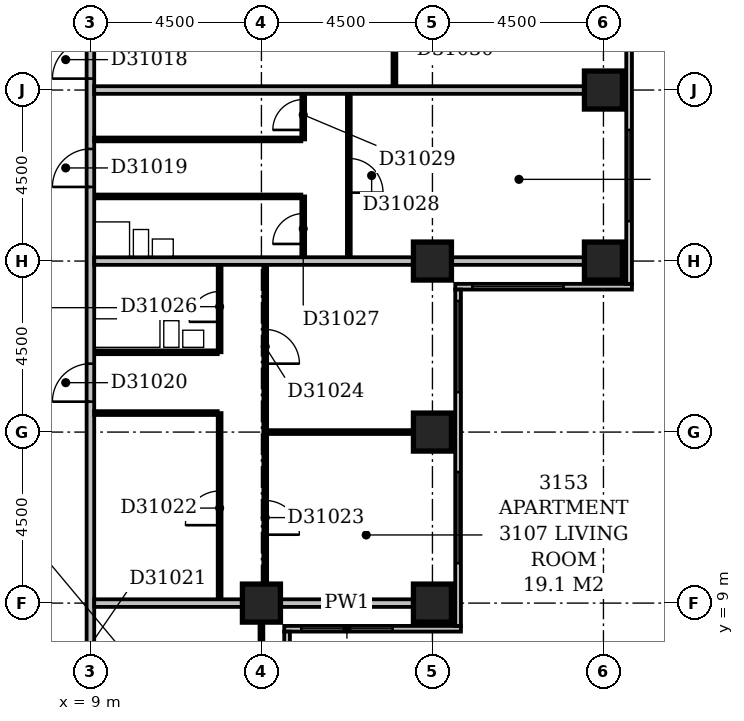
"""IFC4 building model, lengths in metres.
Left out: names, types, materials, properties, quantities, classifications, styles, units other than length and angle.
Written with IfcOpenShell. Run it as: python <this file> out.ifc"""

import sys

from ifc_helpers import new_model, si_unit, direction, frame, frame_2d, origin, origin_2d, place, context, subcontext, project, spatial, rectangle, extrude, element, fill, save


model = new_model("IFC4")
c1 = context("Model", 3, precision=1e-05, world=origin(), true_north=direction((0.0, 1.0)))
c2 = subcontext(c1, "Body", "Model", "MODEL_VIEW")
j1 = project(units=[si_unit("LENGTHUNIT", "METRE"), si_unit("PLANEANGLEUNIT", "RADIAN")], contexts=[c1])
p1 = place(None, origin())
s1 = spatial("IfcSite", under=j1, at=p1, CompositionType="ELEMENT")
p2 = place(p1, origin())
s2 = spatial("IfcBuilding", under=s1, at=p2, CompositionType="ELEMENT")
p3 = place(p2, frame((0.0, 0.0, 126.8)))
s3 = spatial("IfcBuildingStorey", under=s2, at=p3, CompositionType="ELEMENT", Elevation=126.8)
for number, where, z_axis, x_axis in (
    (1, (13.5, 9.0, -0.3), (0.0, 0.0, 1.0), (1.0, 0.0, 0.0)),
    (2, (18.0, 9.0, -0.3), (0.0, 0.0, 1.0), (1.0, 0.0, 0.0)),
    (3, (18.0, 13.5, -0.3), (0.0, 0.0, 1.0), (1.0, 0.0, 0.0)),
    (4, (18.0, 18.0, -0.3), (0.0, 0.0, 1.0), (1.0, 0.0, 0.0)),
    (5, (22.5, 18.0, -0.3), (0.0, 0.0, 1.0), (1.0, 0.0, 0.0)),
    (6, (22.5, 22.5, -0.3), (0.0, 0.0, 1.0), (1.0, 0.0, 0.0)),
):
    element("IfcColumn", number, at=place(p3, frame(where, z_axis=z_axis, x_axis=x_axis)), inside=s3, PredefinedType="COLUMN", context=c2, shape_type="SweptSolid", body=[
        extrude(rectangle(XDim=1.0, YDim=1.0, at=origin_2d()), origin(), (0.0, 0.0, 1.0), 3.6),
    ])
p4 = place(p3, frame((14.175, 3.9, 0.0), z_axis=(0.0, 0.0, 1.0), x_axis=(0.0, 1.0, 0.0)))
e7 = element("IfcWall", 7, at=p4, inside=s3, PredefinedType="STANDARD", context=c2, shape_type="SweptSolid", body=[
    extrude(rectangle(XDim=4.35, YDim=0.15, at=frame_2d((2.175, 0.0))), origin(), (0.0, 0.0, 1.0), 2.7),
])
p5 = place(p4, frame((1.65, 0.0, 0.6)))
e8 = element("IfcOpeningElement", 8, at=p5, cuts=e7, PredefinedType="OPENING", context=c2, shape_type="SweptSolid", body=[
    extrude(rectangle(XDim=2.4, YDim=1.8, at=frame_2d((1.2, 0.9))), frame((0.0, 0.087, 0.0), z_axis=(0.0, -1.0, 0.0), x_axis=(1.0, 0.0, 0.0)), (0.0, 0.0, 1.0), 0.174),
])
p6 = place(p3, frame((14.1, 8.325, 0.0), z_axis=(0.0, 0.0, 1.0), x_axis=(1.0, 0.0, 0.0)))
e9 = element("IfcWall", 9, at=p6, inside=s3, PredefinedType="STANDARD", context=c2, shape_type="SweptSolid", body=[
    extrude(rectangle(XDim=4.65, YDim=0.15, at=frame_2d((2.325, 0.0))), origin(), (0.0, 0.0, 1.0), 2.7),
])
p7 = place(p6, frame((0.45, 0.0, 0.6)))
e10 = element("IfcOpeningElement", 10, at=p7, cuts=e9, PredefinedType="OPENING", context=c2, shape_type="SweptSolid", body=[
    extrude(rectangle(XDim=2.4, YDim=1.8, at=frame_2d((1.2, 0.9))), frame((0.0, 0.087, 0.0), z_axis=(0.0, -1.0, 0.0), x_axis=(1.0, 0.0, 0.0)), (0.0, 0.0, 1.0), 0.174),
])
p8 = place(p3, frame((18.675, 8.4, 0.0), z_axis=(0.0, 0.0, 1.0), x_axis=(0.0, 1.0, 0.0)))
e11 = element("IfcWall", 11, at=p8, inside=s3, PredefinedType="STANDARD", context=c2, shape_type="SweptSolid", body=[
    extrude(rectangle(XDim=8.85, YDim=0.15, at=frame_2d((4.425, 0.0))), origin(), (0.0, 0.0, 1.0), 2.7),
])
p9 = place(p8, frame((1.65, 0.0, 0.6)))
e12 = element("IfcOpeningElement", 12, at=p9, cuts=e11, PredefinedType="OPENING", context=c2, shape_type="SweptSolid", body=[
    extrude(rectangle(XDim=2.4, YDim=1.8, at=frame_2d((1.2, 0.9))), frame((0.0, 0.087, 0.0), z_axis=(0.0, -1.0, 0.0), x_axis=(1.0, 0.0, 0.0)), (0.0, 0.0, 1.0), 0.174),
])
p10 = place(p8, frame((6.15, 0.0, 0.6)))
e13 = element("IfcOpeningElement", 13, at=p10, cuts=e11, PredefinedType="OPENING", context=c2, shape_type="SweptSolid", body=[
    extrude(rectangle(XDim=2.4, YDim=1.8, at=frame_2d((1.2, 0.9))), frame((0.0, 0.087, 0.0), z_axis=(0.0, -1.0, 0.0), x_axis=(1.0, 0.0, 0.0)), (0.0, 0.0, 1.0), 0.174),
])
p11 = place(p3, frame((18.6, 17.325, 0.0), z_axis=(0.0, 0.0, 1.0), x_axis=(1.0, 0.0, 0.0)))
e14 = element("IfcWall", 14, at=p11, inside=s3, PredefinedType="STANDARD", context=c2, shape_type="SweptSolid", body=[
    extrude(rectangle(XDim=4.65, YDim=0.15, at=frame_2d((2.325, 0.0))), origin(), (0.0, 0.0, 1.0), 2.7),
])
p12 = place(p11, frame((0.45, 0.0, 0.6)))
e15 = element("IfcOpeningElement", 15, at=p12, cuts=e14, PredefinedType="OPENING", context=c2, shape_type="SweptSolid", body=[
    extrude(rectangle(XDim=2.4, YDim=1.8, at=frame_2d((1.2, 0.9))), frame((0.0, 0.087, 0.0), z_axis=(0.0, -1.0, 0.0), x_axis=(1.0, 0.0, 0.0)), (0.0, 0.0, 1.0), 0.174),
])
p13 = place(p3, frame((23.175, 17.4, 0.0), z_axis=(0.0, 0.0, 1.0), x_axis=(0.0, 1.0, 0.0)))
e16 = element("IfcWall", 16, at=p13, inside=s3, PredefinedType="STANDARD", context=c2, shape_type="SweptSolid", body=[
    extrude(rectangle(XDim=17.85, YDim=0.15, at=frame_2d((8.925, 0.0))), origin(), (0.0, 0.0, 1.0), 2.7),
])
p14 = place(p13, frame((1.65, 0.0, 0.6)))
e17 = element("IfcOpeningElement", 17, at=p14, cuts=e16, PredefinedType="OPENING", context=c2, shape_type="SweptSolid", body=[
    extrude(rectangle(XDim=2.4, YDim=1.8, at=frame_2d((1.2, 0.9))), frame((0.0, 0.087, 0.0), z_axis=(0.0, -1.0, 0.0), x_axis=(1.0, 0.0, 0.0)), (0.0, 0.0, 1.0), 0.174),
])
p15 = place(p13, frame((6.15, 0.0, 0.6)))
e18 = element("IfcOpeningElement", 18, at=p15, cuts=e16, PredefinedType="OPENING", context=c2, shape_type="SweptSolid", body=[
    extrude(rectangle(XDim=2.4, YDim=1.8, at=frame_2d((1.2, 0.9))), frame((0.0, 0.087, 0.0), z_axis=(0.0, -1.0, 0.0), x_axis=(1.0, 0.0, 0.0)), (0.0, 0.0, 1.0), 0.174),
])
p16 = place(p13, frame((11.498, 0.0, 0.6)))
e19 = element("IfcOpeningElement", 19, at=p16, cuts=e16, PredefinedType="OPENING", context=c2, shape_type="SweptSolid", body=[
    extrude(rectangle(XDim=1.8, YDim=1.8, at=frame_2d((0.9, 0.9))), frame((0.0, 0.087, 0.0), z_axis=(0.0, -1.0, 0.0), x_axis=(1.0, 0.0, 0.0)), (0.0, 0.0, 1.0), 0.174),
])
p17 = place(p13, frame((15.15, 0.0, 0.6)))
e20 = element("IfcOpeningElement", 20, at=p17, cuts=e16, PredefinedType="OPENING", context=c2, shape_type="SweptSolid", body=[
    extrude(rectangle(XDim=2.4, YDim=1.8, at=frame_2d((1.2, 0.9))), frame((0.0, 0.087, 0.0), z_axis=(0.0, -1.0, 0.0), x_axis=(1.0, 0.0, 0.0)), (0.0, 0.0, 1.0), 0.174),
])
p18 = place(p3, frame((9.0, 5.0, 0.0), z_axis=(0.0, 0.0, 1.0), x_axis=(0.0, 1.0, 0.0)))
e21 = element("IfcWall", 21, at=p18, inside=s3, PredefinedType="PARTITIONING", context=c2, shape_type="SweptSolid", body=[
    extrude(rectangle(XDim=27.75, YDim=0.2, at=frame_2d((13.875, 0.0))), origin(), (0.0, 0.0, 1.0), 3.3),
])
p19 = place(p18, frame((17.8, 0.0, 0.0)))
e22 = element("IfcOpeningElement", 22, at=p19, cuts=e21, PredefinedType="OPENING", context=c2, shape_type="SweptSolid", body=[
    extrude(rectangle(XDim=1.0, YDim=2.1, at=frame_2d((0.5, 1.05))), frame((0.0, 0.112, 0.0), z_axis=(0.0, -1.0, 0.0), x_axis=(1.0, 0.0, 0.0)), (0.0, 0.0, 1.0), 0.224),
])
p20 = place(p18, frame((14.95, 0.0, 0.0)))
e23 = element("IfcOpeningElement", 23, at=p20, cuts=e21, PredefinedType="OPENING", context=c2, shape_type="SweptSolid", body=[
    extrude(rectangle(XDim=1.0, YDim=2.1, at=frame_2d((0.5, 1.05))), frame((0.0, 0.112, 0.0), z_axis=(0.0, -1.0, 0.0), x_axis=(1.0, 0.0, 0.0)), (0.0, 0.0, 1.0), 0.224),
])
p21 = place(p18, frame((9.3, 0.0, 0.0)))
e24 = element("IfcOpeningElement", 24, at=p21, cuts=e21, PredefinedType="OPENING", context=c2, shape_type="SweptSolid", body=[
    extrude(rectangle(XDim=1.0, YDim=2.1, at=frame_2d((0.5, 1.05))), frame((0.0, 0.112, 0.0), z_axis=(0.0, -1.0, 0.0), x_axis=(1.0, 0.0, 0.0)), (0.0, 0.0, 1.0), 0.224),
])
p22 = place(p18, frame((1.5, 0.0, 0.0)))
e25 = element("IfcOpeningElement", 25, at=p22, cuts=e21, PredefinedType="OPENING", context=c2, shape_type="SweptSolid", body=[
    extrude(rectangle(XDim=0.9, YDim=2.1, at=frame_2d((0.45, 1.05))), frame((0.0, 0.112, 0.0), z_axis=(0.0, -1.0, 0.0), x_axis=(1.0, 0.0, 0.0)), (0.0, 0.0, 1.0), 0.224),
])
p23 = place(p3, frame((13.5, 5.0, 0.0), z_axis=(0.0, 0.0, 1.0), x_axis=(0.0, 1.0, 0.0)))
e26 = element("IfcWall", 26, at=p23, inside=s3, PredefinedType="PARTITIONING", context=c2, shape_type="SweptSolid", body=[
    extrude(rectangle(XDim=3.5, YDim=0.1, at=frame_2d((1.75, 0.0))), origin(), (0.0, 0.0, 1.0), 2.7),
])
p24 = place(p3, frame((9.1, 9.0, 0.0), z_axis=(0.0, 0.0, 1.0), x_axis=(1.0, 0.0, 0.0)))
e27 = element("IfcWall", 27, at=p24, inside=s3, PredefinedType="PARTITIONING", context=c2, shape_type="SweptSolid", body=[
    extrude(rectangle(XDim=3.9, YDim=0.2, at=frame_2d((1.95, 0.0))), origin(), (0.0, 0.0, 1.0), 3.3),
])
p25 = place(p3, frame((14.0, 9.0, 0.0), z_axis=(0.0, 0.0, 1.0), x_axis=(1.0, 0.0, 0.0)))
e28 = element("IfcWall", 28, at=p25, inside=s3, PredefinedType="PARTITIONING", context=c2, shape_type="SweptSolid", body=[
    extrude(rectangle(XDim=3.5, YDim=0.2, at=frame_2d((1.75, 0.0))), origin(), (0.0, 0.0, 1.0), 2.7),
])
p26 = place(p3, frame((12.4, 9.1, 0.0), z_axis=(0.0, 0.0, 1.0), x_axis=(0.0, 1.0, 0.0)))
e29 = element("IfcWall", 29, at=p26, inside=s3, PredefinedType="PARTITIONING", context=c2, shape_type="SweptSolid", body=[
    extrude(rectangle(XDim=4.9, YDim=0.1, at=frame_2d((2.45, 0.0))), origin(), (0.0, 0.0, 1.0), 3.3),
])
p27 = place(p26, frame((1.95, 0.0, 0.0)))
e30 = element("IfcOpeningElement", 30, at=p27, cuts=e29, PredefinedType="OPENING", context=c2, shape_type="SweptSolid", body=[
    extrude(rectangle(XDim=0.9, YDim=2.1, at=frame_2d((0.45, 1.05))), frame((0.0, 0.062, 0.0), z_axis=(0.0, -1.0, 0.0), x_axis=(1.0, 0.0, 0.0)), (0.0, 0.0, 1.0), 0.124),
])
p28 = place(p3, frame((13.6, 9.5, 0.0), z_axis=(0.0, 0.0, 1.0), x_axis=(0.0, 1.0, 0.0)))
e31 = element("IfcWall", 31, at=p28, inside=s3, PredefinedType="PARTITIONING", context=c2, shape_type="SweptSolid", body=[
    extrude(rectangle(XDim=8.4, YDim=0.1, at=frame_2d((4.2, 0.0))), origin(), (0.0, 0.0, 1.0), 3.3),
])
p29 = place(p28, frame((1.3, 0.0, 0.0)))
e32 = element("IfcOpeningElement", 32, at=p29, cuts=e31, PredefinedType="OPENING", context=c2, shape_type="SweptSolid", body=[
    extrude(rectangle(XDim=0.9, YDim=2.1, at=frame_2d((0.45, 1.05))), frame((0.0, 0.062, 0.0), z_axis=(0.0, -1.0, 0.0), x_axis=(1.0, 0.0, 0.0)), (0.0, 0.0, 1.0), 0.124),
])
p30 = place(p28, frame((5.8, 0.0, 0.0)))
e33 = element("IfcOpeningElement", 33, at=p30, cuts=e31, PredefinedType="OPENING", context=c2, shape_type="SweptSolid", body=[
    extrude(rectangle(XDim=0.9, YDim=2.1, at=frame_2d((0.45, 1.05))), frame((0.0, 0.062, 0.0), z_axis=(0.0, -1.0, 0.0), x_axis=(1.0, 0.0, 0.0)), (0.0, 0.0, 1.0), 0.124),
])
p31 = place(p3, frame((13.65, 13.5, 0.0), z_axis=(0.0, 0.0, 1.0), x_axis=(1.0, 0.0, 0.0)))
e34 = element("IfcWall", 34, at=p31, inside=s3, PredefinedType="PARTITIONING", context=c2, shape_type="SweptSolid", body=[
    extrude(rectangle(XDim=3.85, YDim=0.1, at=frame_2d((1.925, 0.0))), origin(), (0.0, 0.0, 1.0), 3.3),
])
p32 = place(p3, frame((9.1, 14.0, 0.0), z_axis=(0.0, 0.0, 1.0), x_axis=(1.0, 0.0, 0.0)))
e35 = element("IfcWall", 35, at=p32, inside=s3, PredefinedType="PARTITIONING", context=c2, shape_type="SweptSolid", body=[
    extrude(rectangle(XDim=3.25, YDim=0.1, at=frame_2d((1.625, 0.0))), origin(), (0.0, 0.0, 1.0), 3.3),
])
p33 = place(p3, frame((9.1, 15.6, 0.0), z_axis=(0.0, 0.0, 1.0), x_axis=(1.0, 0.0, 0.0)))
e36 = element("IfcWall", 36, at=p33, inside=s3, PredefinedType="PLUMBINGWALL", context=c2, shape_type="SweptSolid", body=[
    extrude(rectangle(XDim=3.25, YDim=0.1, at=frame_2d((1.625, 0.0))), origin(), (0.0, 0.0, 1.0), 3.3),
])
p34 = place(p3, frame((12.4, 15.6, 0.0), z_axis=(0.0, 0.0, 1.0), x_axis=(0.0, 1.0, 0.0)))
e37 = element("IfcWall", 37, at=p34, inside=s3, PredefinedType="PARTITIONING", context=c2, shape_type="SweptSolid", body=[
    extrude(rectangle(XDim=2.3, YDim=0.1, at=frame_2d((1.15, 0.0))), origin(), (0.0, 0.0, 1.0), 3.3),
])
p35 = place(p34, frame((0.8, 0.0, 0.0)))
e38 = element("IfcOpeningElement", 38, at=p35, cuts=e37, PredefinedType="OPENING", context=c2, shape_type="SweptSolid", body=[
    extrude(rectangle(XDim=0.8, YDim=2.1, at=frame_2d((0.4, 1.05))), frame((0.0, 0.062, 0.0), z_axis=(0.0, -1.0, 0.0), x_axis=(1.0, 0.0, 0.0)), (0.0, 0.0, 1.0), 0.124),
])
p36 = place(p3, frame((9.1, 18.0, 0.0), z_axis=(0.0, 0.0, 1.0), x_axis=(1.0, 0.0, 0.0)))
e39 = element("IfcWall", 39, at=p36, inside=s3, PredefinedType="PARTITIONING", context=c2, shape_type="SweptSolid", body=[
    extrude(rectangle(XDim=8.4, YDim=0.2, at=frame_2d((4.2, 0.0))), origin(), (0.0, 0.0, 1.0), 2.6),
])
p37 = place(p3, frame((18.5, 18.0, 0.0), z_axis=(0.0, 0.0, 1.0), x_axis=(1.0, 0.0, 0.0)))
e40 = element("IfcWall", 40, at=p37, inside=s3, PredefinedType="PARTITIONING", context=c2, shape_type="SweptSolid", body=[
    extrude(rectangle(XDim=3.5, YDim=0.2, at=frame_2d((1.75, 0.0))), origin(), (0.0, 0.0, 1.0), 2.7),
])
p38 = place(p3, frame((14.6, 18.1, 0.0), z_axis=(0.0, 0.0, 1.0), x_axis=(0.0, 1.0, 0.0)))
e41 = element("IfcWall", 41, at=p38, inside=s3, PredefinedType="PARTITIONING", context=c2, shape_type="SweptSolid", body=[
    extrude(rectangle(XDim=1.6, YDim=0.1, at=frame_2d((0.8, 0.0))), origin(), (0.0, 0.0, 1.0), 3.3),
])
p39 = place(p38, frame((0.35, 0.0, 0.0)))
e42 = element("IfcOpeningElement", 42, at=p39, cuts=e41, PredefinedType="OPENING", context=c2, shape_type="SweptSolid", body=[
    extrude(rectangle(XDim=0.8, YDim=2.1, at=frame_2d((0.4, 1.05))), frame((0.0, 0.062, 0.0), z_axis=(0.0, -1.0, 0.0), x_axis=(1.0, 0.0, 0.0)), (0.0, 0.0, 1.0), 0.124),
])
p40 = place(p3, frame((15.8, 18.1, 0.0), z_axis=(0.0, 0.0, 1.0), x_axis=(0.0, 1.0, 0.0)))
e43 = element("IfcWall", 43, at=p40, inside=s3, PredefinedType="PARTITIONING", context=c2, shape_type="SweptSolid", body=[
    extrude(rectangle(XDim=4.3, YDim=0.1, at=frame_2d((2.15, 0.0))), origin(), (0.0, 0.0, 1.0), 3.3),
])
p41 = place(p40, frame((1.7, 0.0, 0.0)))
e44 = element("IfcOpeningElement", 44, at=p41, cuts=e43, PredefinedType="OPENING", context=c2, shape_type="SweptSolid", body=[
    extrude(rectangle(XDim=0.9, YDim=2.1, at=frame_2d((0.45, 1.05))), frame((0.0, 0.062, 0.0), z_axis=(0.0, -1.0, 0.0), x_axis=(1.0, 0.0, 0.0)), (0.0, 0.0, 1.0), 0.124),
])
p42 = place(p3, frame((9.1, 19.7, 0.0), z_axis=(0.0, 0.0, 1.0), x_axis=(1.0, 0.0, 0.0)))
e45 = element("IfcWall", 45, at=p42, inside=s3, PredefinedType="PLUMBINGWALL", context=c2, shape_type="SweptSolid", body=[
    extrude(rectangle(XDim=5.45, YDim=0.1, at=frame_2d((2.725, 0.0))), origin(), (0.0, 0.0, 1.0), 3.3),
])
p43 = place(p3, frame((9.1, 21.2, 0.0), z_axis=(0.0, 0.0, 1.0), x_axis=(1.0, 0.0, 0.0)))
e46 = element("IfcWall", 46, at=p43, inside=s3, PredefinedType="PARTITIONING", context=c2, shape_type="SweptSolid", body=[
    extrude(rectangle(XDim=5.45, YDim=0.1, at=frame_2d((2.725, 0.0))), origin(), (0.0, 0.0, 1.0), 3.3),
])
p44 = place(p3, frame((14.6, 21.2, 0.0), z_axis=(0.0, 0.0, 1.0), x_axis=(0.0, 1.0, 0.0)))
e47 = element("IfcWall", 47, at=p44, inside=s3, PredefinedType="PARTITIONING", context=c2, shape_type="SweptSolid", body=[
    extrude(rectangle(XDim=1.2, YDim=0.1, at=frame_2d((0.6, 0.0))), origin(), (0.0, 0.0, 1.0), 3.3),
])
p45 = place(p44, frame((0.25, 0.0, 0.0)))
e48 = element("IfcOpeningElement", 48, at=p45, cuts=e47, PredefinedType="OPENING", context=c2, shape_type="SweptSolid", body=[
    extrude(rectangle(XDim=0.8, YDim=2.1, at=frame_2d((0.4, 1.05))), frame((0.0, 0.062, 0.0), z_axis=(0.0, -1.0, 0.0), x_axis=(1.0, 0.0, 0.0)), (0.0, 0.0, 1.0), 0.124),
])
p46 = place(p3, frame((9.1, 22.5, 0.0), z_axis=(0.0, 0.0, 1.0), x_axis=(1.0, 0.0, 0.0)))
e49 = element("IfcWall", 49, at=p46, inside=s3, PredefinedType="PARTITIONING", context=c2, shape_type="SweptSolid", body=[
    extrude(rectangle(XDim=12.9, YDim=0.2, at=frame_2d((6.45, 0.0))), origin(), (0.0, 0.0, 1.0), 3.3),
])
p47 = place(p3, frame((17.0, 22.6, 0.0), z_axis=(0.0, 0.0, 1.0), x_axis=(0.0, 1.0, 0.0)))
e50 = element("IfcWall", 50, at=p47, inside=s3, PredefinedType="PARTITIONING", context=c2, shape_type="SweptSolid", body=[
    extrude(rectangle(XDim=8.8, YDim=0.1, at=frame_2d((4.4, 0.0))), origin(), (0.0, 0.0, 1.0), 3.3),
])
p48 = place(p47, frame((1.7, 0.0, 0.0)))
e51 = element("IfcOpeningElement", 51, at=p48, cuts=e50, PredefinedType="OPENING", context=c2, shape_type="SweptSolid", body=[
    extrude(rectangle(XDim=0.9, YDim=2.1, at=frame_2d((0.45, 1.05))), frame((0.0, 0.062, 0.0), z_axis=(0.0, -1.0, 0.0), x_axis=(1.0, 0.0, 0.0)), (0.0, 0.0, 1.0), 0.124),
])
p49 = place(p47, frame((6.2, 0.0, 0.0)))
e52 = element("IfcOpeningElement", 52, at=p49, cuts=e50, PredefinedType="OPENING", context=c2, shape_type="SweptSolid", body=[
    extrude(rectangle(XDim=0.9, YDim=2.1, at=frame_2d((0.45, 1.05))), frame((0.0, 0.062, 0.0), z_axis=(0.0, -1.0, 0.0), x_axis=(1.0, 0.0, 0.0)), (0.0, 0.0, 1.0), 0.124),
])
p50 = place(p7, origin())
e53 = element("IfcWindow", 53, at=p50, inside=s3, PartitioningType="SINGLE_PANEL", PredefinedType="WINDOW", context=c2, shape_type="SweptSolid", body=[
    extrude(rectangle(XDim=2.4, YDim=1.8, at=frame_2d((1.2, 0.9))), frame((0.0, 0.03, 0.0), z_axis=(0.0, -1.0, 0.0), x_axis=(1.0, 0.0, 0.0)), (0.0, 0.0, 1.0), 0.06),
])
fill(e10, e53)
p51 = place(p9, origin())
e54 = element("IfcWindow", 54, at=p51, inside=s3, PartitioningType="SINGLE_PANEL", PredefinedType="WINDOW", context=c2, shape_type="SweptSolid", body=[
    extrude(rectangle(XDim=2.4, YDim=1.8, at=frame_2d((1.2, 0.9))), frame((0.0, 0.03, 0.0), z_axis=(0.0, -1.0, 0.0), x_axis=(1.0, 0.0, 0.0)), (0.0, 0.0, 1.0), 0.06),
])
fill(e12, e54)
p52 = place(p10, origin())
e55 = element("IfcWindow", 55, at=p52, inside=s3, PartitioningType="SINGLE_PANEL", PredefinedType="WINDOW", context=c2, shape_type="SweptSolid", body=[
    extrude(rectangle(XDim=2.4, YDim=1.8, at=frame_2d((1.2, 0.9))), frame((0.0, 0.03, 0.0), z_axis=(0.0, -1.0, 0.0), x_axis=(1.0, 0.0, 0.0)), (0.0, 0.0, 1.0), 0.06),
])
fill(e13, e55)
p53 = place(p12, origin())
e56 = element("IfcWindow", 56, at=p53, inside=s3, PartitioningType="SINGLE_PANEL", PredefinedType="WINDOW", context=c2, shape_type="SweptSolid", body=[
    extrude(rectangle(XDim=2.4, YDim=1.8, at=frame_2d((1.2, 0.9))), frame((0.0, 0.03, 0.0), z_axis=(0.0, -1.0, 0.0), x_axis=(1.0, 0.0, 0.0)), (0.0, 0.0, 1.0), 0.06),
])
fill(e15, e56)
p54 = place(p14, origin())
e57 = element("IfcWindow", 57, at=p54, inside=s3, PartitioningType="SINGLE_PANEL", PredefinedType="WINDOW", context=c2, shape_type="SweptSolid", body=[
    extrude(rectangle(XDim=2.4, YDim=1.8, at=frame_2d((1.2, 0.9))), frame((0.0, 0.03, 0.0), z_axis=(0.0, -1.0, 0.0), x_axis=(1.0, 0.0, 0.0)), (0.0, 0.0, 1.0), 0.06),
])
fill(e17, e57)
p55 = place(p19, origin())
e58 = element("IfcDoor", 58, at=p55, inside=s3, OperationType="SINGLE_SWING_LEFT", PredefinedType="DOOR", context=c2, shape_type="SweptSolid", body=[
    extrude(rectangle(XDim=1.0, YDim=2.1, at=frame_2d((0.5, 1.05))), frame((0.0, 0.025, 0.0), z_axis=(0.0, -1.0, 0.0), x_axis=(1.0, 0.0, 0.0)), (0.0, 0.0, 1.0), 0.05),
])
fill(e22, e58)
p56 = place(p20, origin())
e59 = element("IfcDoor", 59, at=p56, inside=s3, OperationType="SINGLE_SWING_LEFT", PredefinedType="DOOR", context=c2, shape_type="SweptSolid", body=[
    extrude(rectangle(XDim=1.0, YDim=2.1, at=frame_2d((0.5, 1.05))), frame((0.0, 0.025, 0.0), z_axis=(0.0, -1.0, 0.0), x_axis=(1.0, 0.0, 0.0)), (0.0, 0.0, 1.0), 0.05),
])
fill(e23, e59)
p57 = place(p21, origin())
e60 = element("IfcDoor", 60, at=p57, inside=s3, OperationType="SINGLE_SWING_LEFT", PredefinedType="DOOR", context=c2, shape_type="SweptSolid", body=[
    extrude(rectangle(XDim=1.0, YDim=2.1, at=frame_2d((0.5, 1.05))), frame((0.0, 0.025, 0.0), z_axis=(0.0, -1.0, 0.0), x_axis=(1.0, 0.0, 0.0)), (0.0, 0.0, 1.0), 0.05),
])
fill(e24, e60)
p58 = place(p27, origin())
e61 = element("IfcDoor", 61, at=p58, inside=s3, OperationType="SINGLE_SWING_LEFT", PredefinedType="DOOR", context=c2, shape_type="SweptSolid", body=[
    extrude(rectangle(XDim=0.9, YDim=2.1, at=frame_2d((0.45, 1.05))), frame((0.0, 0.025, 0.0), z_axis=(0.0, -1.0, 0.0), x_axis=(1.0, 0.0, 0.0)), (0.0, 0.0, 1.0), 0.05),
])
fill(e30, e61)
p59 = place(p29, frame((0.9, 0.0, 0.0), z_axis=(0.0, 0.0, 1.0), x_axis=(-1.0, 0.0, 0.0)))
e62 = element("IfcDoor", 62, at=p59, inside=s3, OperationType="SINGLE_SWING_RIGHT", PredefinedType="DOOR", context=c2, shape_type="SweptSolid", body=[
    extrude(rectangle(XDim=0.9, YDim=2.1, at=frame_2d((0.45, 1.05))), frame((0.0, 0.025, 0.0), z_axis=(0.0, -1.0, 0.0), x_axis=(1.0, 0.0, 0.0)), (0.0, 0.0, 1.0), 0.05),
])
fill(e32, e62)
p60 = place(p30, frame((0.9, 0.0, 0.0), z_axis=(0.0, 0.0, 1.0), x_axis=(-1.0, 0.0, 0.0)))
e63 = element("IfcDoor", 63, at=p60, inside=s3, OperationType="SINGLE_SWING_RIGHT", PredefinedType="DOOR", context=c2, shape_type="SweptSolid", body=[
    extrude(rectangle(XDim=0.9, YDim=2.1, at=frame_2d((0.45, 1.05))), frame((0.0, 0.025, 0.0), z_axis=(0.0, -1.0, 0.0), x_axis=(1.0, 0.0, 0.0)), (0.0, 0.0, 1.0), 0.05),
])
fill(e33, e63)
p61 = place(p35, origin())
e64 = element("IfcDoor", 64, at=p61, inside=s3, OperationType="SINGLE_SWING_LEFT", PredefinedType="DOOR", context=c2, shape_type="SweptSolid", body=[
    extrude(rectangle(XDim=0.8, YDim=2.1, at=frame_2d((0.4, 1.05))), frame((0.0, 0.025, 0.0), z_axis=(0.0, -1.0, 0.0), x_axis=(1.0, 0.0, 0.0)), (0.0, 0.0, 1.0), 0.05),
])
fill(e38, e64)
p62 = place(p39, origin())
e65 = element("IfcDoor", 65, at=p62, inside=s3, OperationType="SINGLE_SWING_LEFT", PredefinedType="DOOR", context=c2, shape_type="SweptSolid", body=[
    extrude(rectangle(XDim=0.8, YDim=2.1, at=frame_2d((0.4, 1.05))), frame((0.0, 0.025, 0.0), z_axis=(0.0, -1.0, 0.0), x_axis=(1.0, 0.0, 0.0)), (0.0, 0.0, 1.0), 0.05),
])
fill(e42, e65)
p63 = place(p41, frame((0.9, 0.0, 0.0), z_axis=(0.0, 0.0, 1.0), x_axis=(-1.0, 0.0, 0.0)))
e66 = element("IfcDoor", 66, at=p63, inside=s3, OperationType="SINGLE_SWING_RIGHT", PredefinedType="DOOR", context=c2, shape_type="SweptSolid", body=[
    extrude(rectangle(XDim=0.9, YDim=2.1, at=frame_2d((0.45, 1.05))), frame((0.0, 0.025, 0.0), z_axis=(0.0, -1.0, 0.0), x_axis=(1.0, 0.0, 0.0)), (0.0, 0.0, 1.0), 0.05),
])
fill(e44, e66)
p64 = place(p45, origin())
e67 = element("IfcDoor", 67, at=p64, inside=s3, OperationType="SINGLE_SWING_LEFT", PredefinedType="DOOR", context=c2, shape_type="SweptSolid", body=[
    extrude(rectangle(XDim=0.8, YDim=2.1, at=frame_2d((0.4, 1.05))), frame((0.0, 0.025, 0.0), z_axis=(0.0, -1.0, 0.0), x_axis=(1.0, 0.0, 0.0)), (0.0, 0.0, 1.0), 0.05),
])
fill(e48, e67)
save(model, sys.argv[1])
